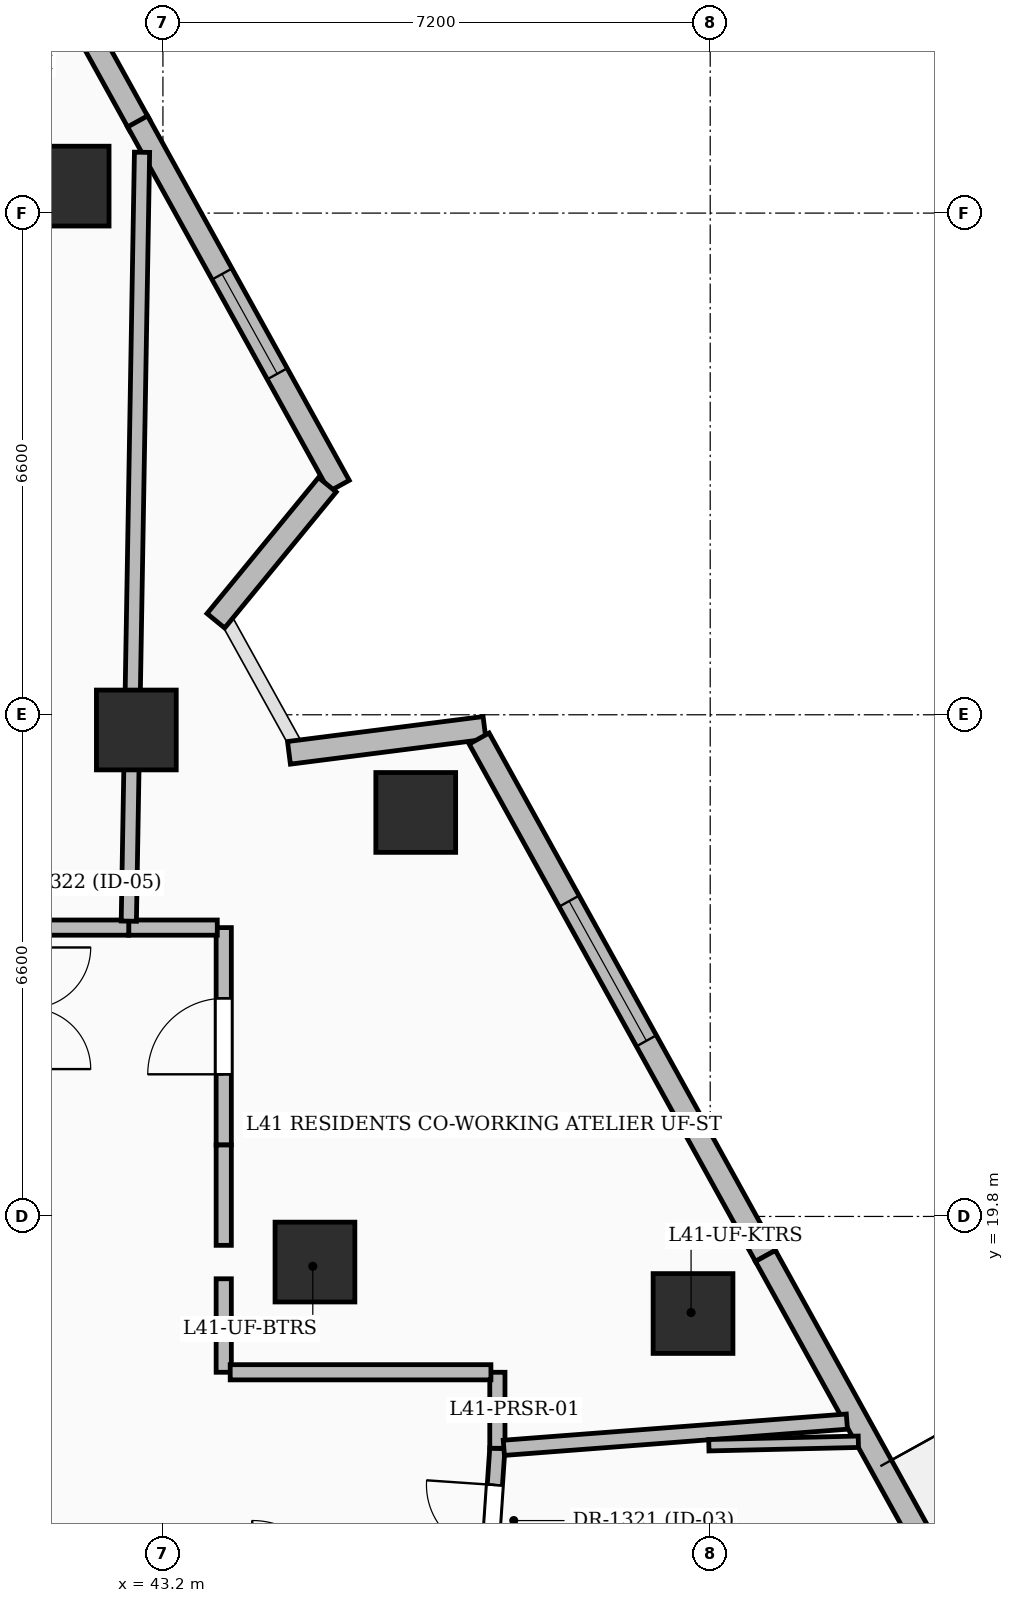
"""IFC4 building model, lengths in metres.
Left out: names, types, materials, properties, quantities, classifications, styles, units other than length and angle.
Written with IfcOpenShell. Run it as: python <this file> out.ifc"""

import sys

from ifc_helpers import new_model, si_unit, direction, frame, frame_2d, origin, origin_2d, place, context, subcontext, project, spatial, rectangle, extrude, element, fill, save


model = new_model("IFC4")
c1 = context("Model", 3, precision=1e-05, world=origin(), true_north=direction((0.0, 1.0)))
c2 = subcontext(c1, "Body", "Model", "MODEL_VIEW")
j1 = project(units=[si_unit("LENGTHUNIT", "METRE"), si_unit("PLANEANGLEUNIT", "RADIAN")], contexts=[c1])
p1 = place(None, origin())
s1 = spatial("IfcSite", under=j1, at=p1, CompositionType="ELEMENT")
p2 = place(p1, origin())
s2 = spatial("IfcBuilding", under=s1, at=p2, CompositionType="ELEMENT")
p3 = place(p2, frame((0.0, 0.0, 160.8)))
s3 = spatial("IfcBuildingStorey", under=s2, at=p3, CompositionType="ELEMENT", Elevation=160.8)
for number, where, z_axis, x_axis in (
    (1, (45.2, 19.2, 0.0), (0.0, 0.0, 1.0), (1.0, 0.0, 0.0)),
    (2, (42.85, 26.2, 0.0), (0.0, 0.0, 1.0), (1.0, 0.0, 0.0)),
    (3, (50.174, 18.523, 0.0), (0.0, 0.0, 1.0), (1.0, 0.0, 0.0)),
    (4, (46.526, 25.115, 0.0), (0.0, 0.0, 1.0), (1.0, 0.0, 0.0)),
    (5, (41.966, 33.355, 0.0), (0.0, 0.0, 1.0), (1.0, 0.0, 0.0)),
):
    element("IfcColumn", number, at=place(p3, frame(where, z_axis=z_axis, x_axis=x_axis)), inside=s3, PredefinedType="COLUMN", context=c2, shape_type="SweptSolid", body=[
        extrude(rectangle(XDim=1.05, YDim=1.05, at=origin_2d()), origin(), (0.0, 0.0, 1.0), 3.6),
    ])
p4 = place(p3, frame((40.155, 39.106, 0.0), z_axis=(0.0, 0.0, 1.0), x_axis=(0.484204903903, -0.874954633702, 0.0)))
e6 = element("IfcWall", 6, at=p4, inside=s3, PredefinedType="SOLIDWALL", context=c2, shape_type="SweptSolid", body=[
    extrude(rectangle(XDim=5.653, YDim=0.3, at=frame_2d((2.827, 0.0))), origin(), (0.0, 0.0, 1.0), 3.35),
])
p5 = place(p4, frame((2.01, 0.0, 0.55)))
e7 = element("IfcOpeningElement", 7, at=p5, cuts=e6, PredefinedType="OPENING", context=c2, shape_type="SweptSolid", body=[
    extrude(rectangle(XDim=1.6, YDim=2.2, at=frame_2d((0.8, 1.1))), frame((0.0, 0.16, 0.0), z_axis=(0.0, -1.0, 0.0), x_axis=(1.0, 0.0, 0.0)), (0.0, 0.0, 1.0), 0.32),
])
p6 = place(p3, frame((42.866, 34.206, 0.0), z_axis=(0.0, 0.0, 1.0), x_axis=(0.484193476584, -0.874960957548, 0.0)))
e8 = element("IfcWall", 8, at=p6, inside=s3, PredefinedType="SOLIDWALL", context=c2, shape_type="SweptSolid", body=[
    extrude(rectangle(XDim=5.48, YDim=0.3, at=frame_2d((2.74, 0.0))), origin(), (0.0, 0.0, 1.0), 3.35),
])
p7 = place(p6, frame((2.295, 0.0, 0.6)))
e9 = element("IfcOpeningElement", 9, at=p7, cuts=e8, PredefinedType="OPENING", context=c2, shape_type="SweptSolid", body=[
    extrude(rectangle(XDim=1.5, YDim=2.1, at=frame_2d((0.75, 1.05))), frame((0.0, 0.16, 0.0), z_axis=(0.0, -1.0, 0.0), x_axis=(1.0, 0.0, 0.0)), (0.0, 0.0, 1.0), 0.32),
])
p8 = place(p3, frame((45.363, 29.426, 0.0), z_axis=(0.0, 0.0, 1.0), x_axis=(-0.634082112051, -0.773265720937, 0.0)))
e10 = element("IfcWall", 10, at=p8, inside=s3, PredefinedType="SOLIDWALL", context=c2, shape_type="SweptSolid", body=[
    extrude(rectangle(XDim=2.314, YDim=0.3, at=frame_2d((1.157, 0.0))), origin(), (0.0, 0.0, 1.0), 2.575),
])
p9 = place(p3, frame((44.858, 25.899, 0.0), z_axis=(0.0, 0.0, 1.0), x_axis=(0.991953049751, 0.126606267974, 0.0)))
e11 = element("IfcWall", 11, at=p9, inside=s3, PredefinedType="SOLIDWALL", context=c2, shape_type="SweptSolid", body=[
    extrude(rectangle(XDim=2.594, YDim=0.3, at=frame_2d((1.297, 0.0))), origin(), (0.0, 0.0, 1.0), 2.575),
])
p10 = place(p3, frame((47.36, 26.087, 0.0), z_axis=(0.0, 0.0, 1.0), x_axis=(0.484182040501, -0.874967286049, 0.0)))
e12 = element("IfcWall", 12, at=p10, inside=s3, PredefinedType="SOLIDWALL", context=c2, shape_type="SweptSolid", body=[
    extrude(rectangle(XDim=7.779, YDim=0.3, at=frame_2d((3.89, 0.0))), origin(), (0.0, 0.0, 1.0), 3.35),
])
p11 = place(p10, frame((2.445, 0.0, 0.55)))
e13 = element("IfcOpeningElement", 13, at=p11, cuts=e12, PredefinedType="OPENING", context=c2, shape_type="SweptSolid", body=[
    extrude(rectangle(XDim=2.1, YDim=2.4, at=frame_2d((1.05, 1.2))), frame((0.0, 0.16, 0.0), z_axis=(0.0, -1.0, 0.0), x_axis=(1.0, 0.0, 0.0)), (0.0, 0.0, 1.0), 0.32),
])
p12 = place(p3, frame((51.126, 19.281, 0.0), z_axis=(0.0, 0.0, 1.0), x_axis=(0.484181305153, -0.87496769297, 0.0)))
e14 = element("IfcWall", 14, at=p12, inside=s3, PredefinedType="SOLIDWALL", context=c2, shape_type="SweptSolid", body=[
    extrude(rectangle(XDim=8.059, YDim=0.3, at=frame_2d((4.03, 0.0))), origin(), (0.0, 0.0, 1.0), 3.35),
])
p13 = place(p12, frame((5.335, 0.0, 0.0)))
e15 = element("IfcOpeningElement", 15, at=p13, cuts=e14, PredefinedType="OPENING", context=c2, shape_type="SweptSolid", body=[
    extrude(rectangle(XDim=1.0, YDim=2.2, at=frame_2d((0.5, 1.1))), frame((0.0, 0.16, 0.0), z_axis=(0.0, -1.0, 0.0), x_axis=(1.0, 0.0, 0.0)), (0.0, 0.0, 1.0), 0.32),
])
p14 = place(p3, frame((47.425, 14.2, 0.0), z_axis=(0.0, 0.0, 1.0), x_axis=(0.068484119878, 0.997652206595, 0.0)))
e16 = element("IfcWall", 16, at=p14, inside=s3, PredefinedType="PARTITIONING", context=c2, shape_type="SweptSolid", body=[
    extrude(rectangle(XDim=2.556, YDim=0.2, at=frame_2d((1.278, 0.0))), origin(), (0.0, 0.0, 1.0), 2.393),
])
p15 = place(p14, frame((1.172, 0.0, 0.0)))
e17 = element("IfcOpeningElement", 17, at=p15, cuts=e16, PredefinedType="OPENING", context=c2, shape_type="SweptSolid", body=[
    extrude(rectangle(XDim=0.9, YDim=2.1, at=frame_2d((0.45, 1.05))), frame((0.0, 0.11, 0.0), z_axis=(0.0, -1.0, 0.0), x_axis=(1.0, 0.0, 0.0)), (0.0, 0.0, 1.0), 0.22),
])
p16 = place(p3, frame((44.0, 20.74, 0.0), z_axis=(0.0, 0.0, 1.0), x_axis=(0.0, 1.0, 0.0)))
e18 = element("IfcWall", 18, at=p16, inside=s3, PredefinedType="PARTITIONING", context=c2, shape_type="SweptSolid", body=[
    extrude(rectangle(XDim=2.86, YDim=0.2, at=frame_2d((1.43, 0.0))), origin(), (0.0, 0.0, 1.0), 2.436),
])
p17 = place(p16, frame((0.93, 0.0, 0.0)))
e19 = element("IfcOpeningElement", 19, at=p17, cuts=e18, PredefinedType="OPENING", context=c2, shape_type="SweptSolid", body=[
    extrude(rectangle(XDim=1.0, YDim=2.2, at=frame_2d((0.5, 1.1))), frame((0.0, 0.11, 0.0), z_axis=(0.0, -1.0, 0.0), x_axis=(1.0, 0.0, 0.0)), (0.0, 0.0, 1.0), 0.22),
])
p18 = place(p3, frame((43.915, 23.6, 0.0), z_axis=(0.0, 0.0, 1.0), x_axis=(-1.0, 0.0, 0.0)))
e20 = element("IfcWall", 20, at=p18, inside=s3, PredefinedType="PARTITIONING", context=c2, shape_type="SweptSolid", body=[
    extrude(rectangle(XDim=1.165, YDim=0.2, at=frame_2d((0.583, 0.0))), origin(), (0.0, 0.0, 1.0), 2.436),
])
p19 = place(p3, frame((47.6, 16.75, 0.0), z_axis=(0.0, 0.0, 1.0), x_axis=(0.0, 1.0, 0.0)))
e21 = element("IfcWall", 21, at=p19, inside=s3, PredefinedType="PARTITIONING", context=c2, shape_type="SweptSolid", body=[
    extrude(rectangle(XDim=1.0, YDim=0.2, at=frame_2d((0.5, 0.0))), origin(), (0.0, 0.0, 1.0), 2.709),
])
p20 = place(p3, frame((44.0, 17.75, 0.0), z_axis=(0.0, 0.0, 1.0), x_axis=(0.0, 1.0, 0.0)))
e22 = element("IfcWall", 22, at=p20, inside=s3, PredefinedType="PARTITIONING", context=c2, shape_type="SweptSolid", body=[
    extrude(rectangle(XDim=1.23, YDim=0.2, at=frame_2d((0.615, 0.0))), origin(), (0.0, 0.0, 1.0), 3.35),
])
p21 = place(p3, frame((42.75, 23.6, 0.0), z_axis=(0.0, 0.0, 1.0), x_axis=(-1.0, 0.0, 0.0)))
e23 = element("IfcWall", 23, at=p21, inside=s3, PredefinedType="PARTITIONING", context=c2, shape_type="SweptSolid", body=[
    extrude(rectangle(XDim=1.3, YDim=0.2, at=frame_2d((0.65, 0.0))), origin(), (0.0, 0.0, 1.0), 3.35),
])
p22 = place(p3, frame((52.198, 17.101, 0.0), z_axis=(0.0, 0.0, 1.0), x_axis=(-0.997091490512, -0.076213906529, 0.0)))
e24 = element("IfcWall", 24, at=p22, inside=s3, PredefinedType="PARTITIONING", context=c2, shape_type="SweptSolid", body=[
    extrude(rectangle(XDim=4.526, YDim=0.2, at=frame_2d((2.263, 0.0))), origin(), (0.0, 0.0, 1.0), 2.393),
])
p23 = place(p3, frame((42.925, 33.8, 0.0), z_axis=(0.0, 0.0, 1.0), x_axis=(-0.017206788201, -0.999851952261, 0.0)))
e25 = element("IfcWall", 25, at=p23, inside=s3, PredefinedType="PARTITIONING", context=c2, shape_type="SweptSolid", body=[
    extrude(rectangle(XDim=10.116, YDim=0.2, at=frame_2d((5.058, 0.0))), origin(), (0.0, 0.0, 1.0), 2.393),
])
p24 = place(p3, frame((47.515, 17.75, 0.0), z_axis=(0.0, 0.0, 1.0), x_axis=(-1.0, 0.0, 0.0)))
e26 = element("IfcWall", 26, at=p24, inside=s3, PredefinedType="PARTITIONING", context=c2, shape_type="SweptSolid", body=[
    extrude(rectangle(XDim=3.43, YDim=0.2, at=frame_2d((1.715, 0.0))), origin(), (0.0, 0.0, 1.0), 2.436),
])
p25 = place(p3, frame((44.0, 19.42, 0.0), z_axis=(0.0, 0.0, 1.0), x_axis=(0.0, 1.0, 0.0)))
e27 = element("IfcWall", 27, at=p25, inside=s3, PredefinedType="PARTITIONING", context=c2, shape_type="SweptSolid", body=[
    extrude(rectangle(XDim=1.32, YDim=0.2, at=frame_2d((0.66, 0.0))), origin(), (0.0, 0.0, 1.0), 3.35),
])
p26 = place(p3, frame((52.349, 16.836, 0.0), z_axis=(0.0, 0.0, 1.0), x_axis=(-0.999727879239, -0.023327397455, 0.0)))
e28 = element("IfcWall", 28, at=p26, inside=s3, PredefinedType="PARTITIONING", context=c2, shape_type="SweptSolid", body=[
    extrude(rectangle(XDim=1.968, YDim=0.15, at=frame_2d((0.984, 0.0))), origin(), (0.0, 0.0, 1.0), 2.393),
])
p27 = place(p7, origin())
e29 = element("IfcWindow", 29, at=p27, inside=s3, PartitioningType="SINGLE_PANEL", PredefinedType="WINDOW", context=c2, shape_type="SweptSolid", body=[
    extrude(rectangle(XDim=1.5, YDim=2.1, at=frame_2d((0.75, 1.05))), frame((0.0, 0.03, 0.0), z_axis=(0.0, -1.0, 0.0), x_axis=(1.0, 0.0, 0.0)), (0.0, 0.0, 1.0), 0.06),
])
fill(e9, e29)
p28 = place(p11, origin())
e30 = element("IfcWindow", 30, at=p28, inside=s3, PartitioningType="SINGLE_PANEL", PredefinedType="WINDOW", context=c2, shape_type="SweptSolid", body=[
    extrude(rectangle(XDim=2.1, YDim=2.4, at=frame_2d((1.05, 1.2))), frame((0.0, 0.03, 0.0), z_axis=(0.0, -1.0, 0.0), x_axis=(1.0, 0.0, 0.0)), (0.0, 0.0, 1.0), 0.06),
])
fill(e13, e30)
p29 = place(p15, origin())
e31 = element("IfcDoor", 31, at=p29, inside=s3, OperationType="SINGLE_SWING_RIGHT", PredefinedType="DOOR", context=c2, shape_type="SweptSolid", body=[
    extrude(rectangle(XDim=0.9, YDim=2.1, at=frame_2d((0.45, 1.05))), frame((0.0, 0.025, 0.0), z_axis=(0.0, -1.0, 0.0), x_axis=(1.0, 0.0, 0.0)), (0.0, 0.0, 1.0), 0.05),
])
fill(e17, e31)
p30 = place(p17, origin())
e32 = element("IfcDoor", 32, at=p30, inside=s3, OperationType="SINGLE_SWING_LEFT", PredefinedType="DOOR", context=c2, shape_type="SweptSolid", body=[
    extrude(rectangle(XDim=1.0, YDim=2.2, at=frame_2d((0.5, 1.1))), frame((0.0, 0.025, 0.0), z_axis=(0.0, -1.0, 0.0), x_axis=(1.0, 0.0, 0.0)), (0.0, 0.0, 1.0), 0.05),
])
fill(e19, e32)
save(model, sys.argv[1])
